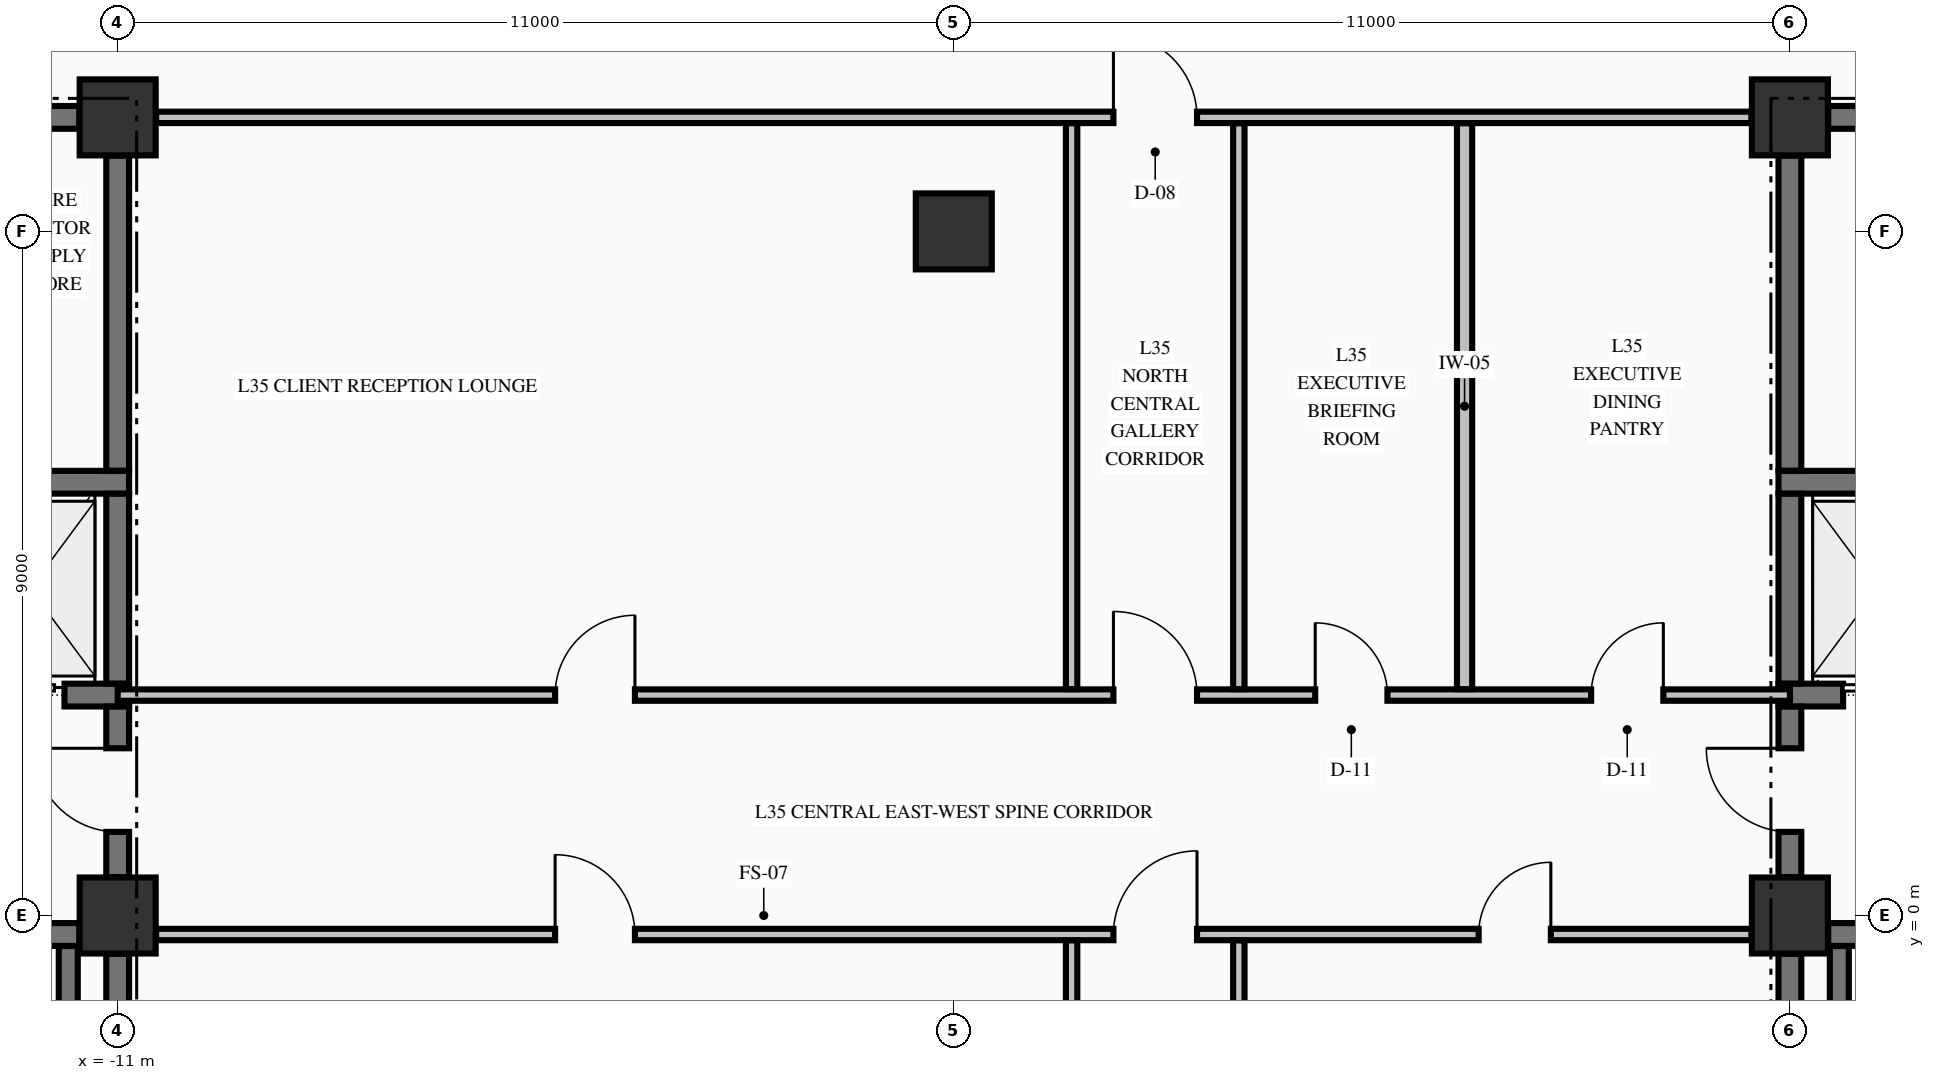
"""IFC4 building model, lengths in metres.
Left out: names, types, materials, properties, quantities, classifications, styles, units other than length and angle.
Written with IfcOpenShell. Run it as: python <this file> out.ifc"""

import sys

from ifc_helpers import new_model, si_unit, direction, frame, frame_2d, origin, origin_2d, place, context, subcontext, project, spatial, rectangle, extrude, element, fill, save


model = new_model("IFC4")
c1 = context("Model", 3, precision=1e-05, world=origin(), true_north=direction((0.0, 1.0)))
c2 = subcontext(c1, "Body", "Model", "MODEL_VIEW")
j1 = project(units=[si_unit("LENGTHUNIT", "METRE"), si_unit("PLANEANGLEUNIT", "RADIAN")], contexts=[c1])
p1 = place(None, origin())
s1 = spatial("IfcSite", under=j1, at=p1, CompositionType="ELEMENT")
p2 = place(p1, origin())
s2 = spatial("IfcBuilding", under=s1, at=p2, CompositionType="ELEMENT")
p3 = place(p2, frame((0.0, 0.0, 139.2)))
s3 = spatial("IfcBuildingStorey", under=s2, at=p3, CompositionType="ELEMENT", Elevation=139.2)
for number, where, z_axis, x_axis in (
    (1, (-11.0, 0.0, -0.25), (0.0, 0.0, 1.0), (1.0, 0.0, 0.0)),
    (2, (-11.0, 10.5, -0.25), (0.0, 0.0, 1.0), (1.0, 0.0, 0.0)),
    (3, (11.0, 0.0, -0.25), (0.0, 0.0, 1.0), (1.0, 0.0, 0.0)),
    (4, (11.0, 10.5, -0.25), (0.0, 0.0, 1.0), (1.0, 0.0, 0.0)),
    (5, (0.0, 9.0, -0.25), (0.0, 0.0, 1.0), (1.0, 0.0, 0.0)),
):
    element("IfcColumn", number, at=place(p3, frame(where, z_axis=z_axis, x_axis=x_axis)), inside=s3, PredefinedType="COLUMN", context=c2, shape_type="SweptSolid", body=[
        extrude(rectangle(XDim=1.0, YDim=1.0, at=origin_2d()), origin(), (0.0, 0.0, 1.0), 3.495),
    ])
p4 = place(p3, frame((-19.496, -0.25, 0.0), z_axis=(0.0, 0.0, 1.0), x_axis=(1.0, 0.0, 0.0)))
e6 = element("IfcWall", 6, at=p4, inside=s3, PredefinedType="SHEAR", context=c2, shape_type="SweptSolid", body=[
    extrude(rectangle(XDim=7.992, YDim=0.3, at=frame_2d((3.996, 0.0))), origin(), (0.0, 0.0, 1.0), 3.245),
])
p5 = place(p4, frame((5.796, 0.0, 0.0)))
e7 = element("IfcOpeningElement", 7, at=p5, cuts=e6, PredefinedType="OPENING", context=c2, shape_type="SweptSolid", body=[
    extrude(rectangle(XDim=1.1, YDim=2.15, at=frame_2d((0.55, 1.075))), frame((0.0, 0.16, 0.0), z_axis=(0.0, -1.0, 0.0), x_axis=(1.0, 0.0, 0.0)), (0.0, 0.0, 1.0), 0.32),
])
p6 = place(p3, frame((11.504, -0.25, 0.0), z_axis=(0.0, 0.0, 1.0), x_axis=(1.0, 0.0, 0.0)))
e8 = element("IfcWall", 8, at=p6, inside=s3, PredefinedType="SHEAR", context=c2, shape_type="SweptSolid", body=[
    extrude(rectangle(XDim=3.371, YDim=0.3, at=frame_2d((1.686, 0.0))), origin(), (0.0, 0.0, 1.0), 3.245),
])
p7 = place(p6, frame((1.096, 0.0, 0.0)))
e9 = element("IfcOpeningElement", 9, at=p7, cuts=e8, PredefinedType="OPENING", context=c2, shape_type="SweptSolid", body=[
    extrude(rectangle(XDim=1.1, YDim=2.15, at=frame_2d((0.55, 1.075))), frame((0.0, 0.16, 0.0), z_axis=(0.0, -1.0, 0.0), x_axis=(1.0, 0.0, 0.0)), (0.0, 0.0, 1.0), 0.32),
])
p8 = place(p3, frame((-14.875, 2.9, 0.0), z_axis=(0.0, 0.0, 1.0), x_axis=(1.0, 0.0, 0.0)))
e10 = element("IfcWall", 10, at=p8, inside=s3, PredefinedType="SHEAR", context=c2, shape_type="SweptSolid", body=[
    extrude(rectangle(XDim=4.025, YDim=0.3, at=frame_2d((2.012, 0.0))), origin(), (0.0, 0.0, 1.0), 3.245),
])
p9 = place(p8, frame((2.075, 0.0, 0.0)))
e11 = element("IfcOpeningElement", 11, at=p9, cuts=e10, PredefinedType="OPENING", context=c2, shape_type="SweptSolid", body=[
    extrude(rectangle(XDim=1.1, YDim=2.2, at=frame_2d((0.55, 1.1))), frame((0.0, 0.16, 0.0), z_axis=(0.0, -1.0, 0.0), x_axis=(1.0, 0.0, 0.0)), (0.0, 0.0, 1.0), 0.32),
])
p10 = place(p3, frame((10.85, 2.9, 0.0), z_axis=(0.0, 0.0, 1.0), x_axis=(1.0, 0.0, 0.0)))
e12 = element("IfcWall", 12, at=p10, inside=s3, PredefinedType="SHEAR", context=c2, shape_type="SweptSolid", body=[
    extrude(rectangle(XDim=4.025, YDim=0.3, at=frame_2d((2.012, 0.0))), origin(), (0.0, 0.0, 1.0), 3.245),
])
p11 = place(p10, frame((0.85, 0.0, 0.0)))
e13 = element("IfcOpeningElement", 13, at=p11, cuts=e12, PredefinedType="OPENING", context=c2, shape_type="SweptSolid", body=[
    extrude(rectangle(XDim=1.1, YDim=2.2, at=frame_2d((0.55, 1.1))), frame((0.0, 0.16, 0.0), z_axis=(0.0, -1.0, 0.0), x_axis=(1.0, 0.0, 0.0)), (0.0, 0.0, 1.0), 0.32),
])
for number, where, z_axis, x_axis in (
    (14, (-14.875, 5.7, 0.0), (0.0, 0.0, 1.0), (1.0, 0.0, 0.0)),
    (15, (10.85, 5.7, 0.0), (0.0, 0.0, 1.0), (1.0, 0.0, 0.0)),
):
    element("IfcWall", number, at=place(p3, frame(where, z_axis=z_axis, x_axis=x_axis)), inside=s3, PredefinedType="SHEAR", context=c2, shape_type="SweptSolid", body=[
        extrude(rectangle(XDim=4.025, YDim=0.3, at=frame_2d((2.012, 0.0))), origin(), (0.0, 0.0, 1.0), 3.245),
    ])
p12 = place(p3, frame((-14.7, 10.5, 0.0), z_axis=(0.0, 0.0, 1.0), x_axis=(1.0, 0.0, 0.0)))
e16 = element("IfcWall", 16, at=p12, inside=s3, PredefinedType="SHEAR", context=c2, shape_type="SweptSolid", body=[
    extrude(rectangle(XDim=3.196, YDim=0.3, at=frame_2d((1.598, 0.0))), origin(), (0.0, 0.0, 1.0), 3.245),
])
p13 = place(p12, frame((0.245, 0.0, 0.0)))
e17 = element("IfcOpeningElement", 17, at=p13, cuts=e16, PredefinedType="OPENING", context=c2, shape_type="SweptSolid", body=[
    extrude(rectangle(XDim=0.95, YDim=2.15, at=frame_2d((0.475, 1.075))), frame((0.0, 0.16, 0.0), z_axis=(0.0, -1.0, 0.0), x_axis=(1.0, 0.0, 0.0)), (0.0, 0.0, 1.0), 0.32),
])
p14 = place(p3, frame((11.504, 10.5, 0.0), z_axis=(0.0, 0.0, 1.0), x_axis=(1.0, 0.0, 0.0)))
e18 = element("IfcWall", 18, at=p14, inside=s3, PredefinedType="SHEAR", context=c2, shape_type="SweptSolid", body=[
    extrude(rectangle(XDim=3.196, YDim=0.3, at=frame_2d((1.598, 0.0))), origin(), (0.0, 0.0, 1.0), 3.245),
])
p15 = place(p14, frame((1.471, 0.0, 0.0)))
e19 = element("IfcOpeningElement", 19, at=p15, cuts=e18, PredefinedType="OPENING", context=c2, shape_type="SweptSolid", body=[
    extrude(rectangle(XDim=0.95, YDim=2.15, at=frame_2d((0.475, 1.075))), frame((0.0, 0.16, 0.0), z_axis=(0.0, -1.0, 0.0), x_axis=(1.0, 0.0, 0.0)), (0.0, 0.0, 1.0), 0.32),
])
p16 = place(p3, frame((-10.494, -0.25, 0.0), z_axis=(0.0, 0.0, 1.0), x_axis=(1.0, 0.0, 0.0)))
e20 = element("IfcWall", 20, at=p16, inside=s3, PredefinedType="PARTITIONING", context=c2, shape_type="SweptSolid", body=[
    extrude(rectangle(XDim=20.988, YDim=0.15, at=frame_2d((10.494, 0.0))), origin(), (0.0, 0.0, 1.0), 3.245),
])
p17 = place(p16, frame((12.594, 0.0, 0.0)))
e21 = element("IfcOpeningElement", 21, at=p17, cuts=e20, PredefinedType="OPENING", context=c2, shape_type="SweptSolid", body=[
    extrude(rectangle(XDim=1.1, YDim=2.15, at=frame_2d((0.55, 1.075))), frame((0.0, 0.085, 0.0), z_axis=(0.0, -1.0, 0.0), x_axis=(1.0, 0.0, 0.0)), (0.0, 0.0, 1.0), 0.17),
])
p18 = place(p16, frame((5.249, 0.0, 0.0)))
e22 = element("IfcOpeningElement", 22, at=p18, cuts=e20, PredefinedType="OPENING", context=c2, shape_type="SweptSolid", body=[
    extrude(rectangle(XDim=1.05, YDim=2.15, at=frame_2d((0.525, 1.075))), frame((0.0, 0.085, 0.0), z_axis=(0.0, -1.0, 0.0), x_axis=(1.0, 0.0, 0.0)), (0.0, 0.0, 1.0), 0.17),
])
p19 = place(p16, frame((17.399, 0.0, 0.0)))
e23 = element("IfcOpeningElement", 23, at=p19, cuts=e20, PredefinedType="OPENING", context=c2, shape_type="SweptSolid", body=[
    extrude(rectangle(XDim=0.95, YDim=2.15, at=frame_2d((0.475, 1.075))), frame((0.0, 0.085, 0.0), z_axis=(0.0, -1.0, 0.0), x_axis=(1.0, 0.0, 0.0)), (0.0, 0.0, 1.0), 0.17),
])
p20 = place(p3, frame((-11.0, 2.9, 0.0), z_axis=(0.0, 0.0, 1.0), x_axis=(1.0, 0.0, 0.0)))
e24 = element("IfcWall", 24, at=p20, inside=s3, PredefinedType="PARTITIONING", context=c2, shape_type="SweptSolid", body=[
    extrude(rectangle(XDim=22.0, YDim=0.15, at=frame_2d((11.0, 0.0))), origin(), (0.0, 0.0, 1.0), 3.245),
])
p21 = place(p20, frame((13.1, 0.0, 0.0)))
e25 = element("IfcOpeningElement", 25, at=p21, cuts=e24, PredefinedType="OPENING", context=c2, shape_type="SweptSolid", body=[
    extrude(rectangle(XDim=1.1, YDim=2.15, at=frame_2d((0.55, 1.075))), frame((0.0, 0.085, 0.0), z_axis=(0.0, -1.0, 0.0), x_axis=(1.0, 0.0, 0.0)), (0.0, 0.0, 1.0), 0.17),
])
p22 = place(p20, frame((5.755, 0.0, 0.0)))
e26 = element("IfcOpeningElement", 26, at=p22, cuts=e24, PredefinedType="OPENING", context=c2, shape_type="SweptSolid", body=[
    extrude(rectangle(XDim=1.05, YDim=2.15, at=frame_2d((0.525, 1.075))), frame((0.0, 0.085, 0.0), z_axis=(0.0, -1.0, 0.0), x_axis=(1.0, 0.0, 0.0)), (0.0, 0.0, 1.0), 0.17),
])
p23 = place(p20, frame((15.755, 0.0, 0.0)))
e27 = element("IfcOpeningElement", 27, at=p23, cuts=e24, PredefinedType="OPENING", context=c2, shape_type="SweptSolid", body=[
    extrude(rectangle(XDim=0.95, YDim=2.15, at=frame_2d((0.475, 1.075))), frame((0.0, 0.085, 0.0), z_axis=(0.0, -1.0, 0.0), x_axis=(1.0, 0.0, 0.0)), (0.0, 0.0, 1.0), 0.17),
])
p24 = place(p20, frame((19.385, 0.0, 0.0)))
e28 = element("IfcOpeningElement", 28, at=p24, cuts=e24, PredefinedType="OPENING", context=c2, shape_type="SweptSolid", body=[
    extrude(rectangle(XDim=0.95, YDim=2.15, at=frame_2d((0.475, 1.075))), frame((0.0, 0.085, 0.0), z_axis=(0.0, -1.0, 0.0), x_axis=(1.0, 0.0, 0.0)), (0.0, 0.0, 1.0), 0.17),
])
p25 = place(p3, frame((-10.494, 10.5, 0.0), z_axis=(0.0, 0.0, 1.0), x_axis=(1.0, 0.0, 0.0)))
e29 = element("IfcWall", 29, at=p25, inside=s3, PredefinedType="PARTITIONING", context=c2, shape_type="SweptSolid", body=[
    extrude(rectangle(XDim=20.988, YDim=0.15, at=frame_2d((10.494, 0.0))), origin(), (0.0, 0.0, 1.0), 3.245),
])
p26 = place(p25, frame((12.594, 0.0, 0.0)))
e30 = element("IfcOpeningElement", 30, at=p26, cuts=e29, PredefinedType="OPENING", context=c2, shape_type="SweptSolid", body=[
    extrude(rectangle(XDim=1.1, YDim=2.15, at=frame_2d((0.55, 1.075))), frame((0.0, 0.085, 0.0), z_axis=(0.0, -1.0, 0.0), x_axis=(1.0, 0.0, 0.0)), (0.0, 0.0, 1.0), 0.17),
])
p27 = place(p3, frame((-11.65, -9.798, 0.0), z_axis=(0.0, 0.0, 1.0), x_axis=(0.0, 1.0, 0.0)))
e31 = element("IfcWall", 31, at=p27, inside=s3, PredefinedType="SOLIDWALL", context=c2, shape_type="SweptSolid", body=[
    extrude(rectangle(XDim=9.396, YDim=0.25, at=frame_2d((4.698, 0.0))), origin(), (0.0, 0.0, 1.0), 3.245),
])
p28 = place(p3, frame((-11.0, -9.446, 0.0), z_axis=(0.0, 0.0, 1.0), x_axis=(0.0, 1.0, 0.0)))
e32 = element("IfcWall", 32, at=p28, inside=s3, PredefinedType="SHEAR", context=c2, shape_type="SweptSolid", body=[
    extrude(rectangle(XDim=8.942, YDim=0.3, at=frame_2d((4.471, 0.0))), origin(), (0.0, 0.0, 1.0), 3.245),
])
p29 = place(p3, frame((-11.0, 0.504, 0.0), z_axis=(0.0, 0.0, 1.0), x_axis=(0.0, 1.0, 0.0)))
e33 = element("IfcWall", 33, at=p29, inside=s3, PredefinedType="SHEAR", context=c2, shape_type="SweptSolid", body=[
    extrude(rectangle(XDim=2.244, YDim=0.3, at=frame_2d((1.122, 0.0))), origin(), (0.0, 0.0, 1.0), 3.245),
])
p30 = place(p29, frame((0.596, 0.0, 0.0)))
e34 = element("IfcOpeningElement", 34, at=p30, cuts=e33, PredefinedType="OPENING", context=c2, shape_type="SweptSolid", body=[
    extrude(rectangle(XDim=1.1, YDim=2.15, at=frame_2d((0.55, 1.075))), frame((0.0, 0.16, 0.0), z_axis=(0.0, -1.0, 0.0), x_axis=(1.0, 0.0, 0.0)), (0.0, 0.0, 1.0), 0.32),
])
p31 = place(p3, frame((-11.0, 3.052, 0.0), z_axis=(0.0, 0.0, 1.0), x_axis=(0.0, 1.0, 0.0)))
e35 = element("IfcWall", 35, at=p31, inside=s3, PredefinedType="SHEAR", context=c2, shape_type="SweptSolid", body=[
    extrude(rectangle(XDim=2.496, YDim=0.3, at=frame_2d((1.248, 0.0))), origin(), (0.0, 0.0, 1.0), 3.245),
])
p32 = place(p3, frame((-11.0, 5.852, 0.0), z_axis=(0.0, 0.0, 1.0), x_axis=(0.0, 1.0, 0.0)))
e36 = element("IfcWall", 36, at=p32, inside=s3, PredefinedType="SHEAR", context=c2, shape_type="SweptSolid", body=[
    extrude(rectangle(XDim=4.144, YDim=0.3, at=frame_2d((2.072, 0.0))), origin(), (0.0, 0.0, 1.0), 3.245),
])
p33 = place(p3, frame((11.0, -9.446, 0.0), z_axis=(0.0, 0.0, 1.0), x_axis=(0.0, 1.0, 0.0)))
e37 = element("IfcWall", 37, at=p33, inside=s3, PredefinedType="SHEAR", context=c2, shape_type="SweptSolid", body=[
    extrude(rectangle(XDim=8.942, YDim=0.3, at=frame_2d((4.471, 0.0))), origin(), (0.0, 0.0, 1.0), 3.245),
])
p34 = place(p3, frame((11.0, 0.504, 0.0), z_axis=(0.0, 0.0, 1.0), x_axis=(0.0, 1.0, 0.0)))
e38 = element("IfcWall", 38, at=p34, inside=s3, PredefinedType="SHEAR", context=c2, shape_type="SweptSolid", body=[
    extrude(rectangle(XDim=2.244, YDim=0.3, at=frame_2d((1.122, 0.0))), origin(), (0.0, 0.0, 1.0), 3.245),
])
p35 = place(p34, frame((0.596, 0.0, 0.0)))
e39 = element("IfcOpeningElement", 39, at=p35, cuts=e38, PredefinedType="OPENING", context=c2, shape_type="SweptSolid", body=[
    extrude(rectangle(XDim=1.1, YDim=2.15, at=frame_2d((0.55, 1.075))), frame((0.0, 0.16, 0.0), z_axis=(0.0, -1.0, 0.0), x_axis=(1.0, 0.0, 0.0)), (0.0, 0.0, 1.0), 0.32),
])
p36 = place(p3, frame((11.0, 3.052, 0.0), z_axis=(0.0, 0.0, 1.0), x_axis=(0.0, 1.0, 0.0)))
e40 = element("IfcWall", 40, at=p36, inside=s3, PredefinedType="SHEAR", context=c2, shape_type="SweptSolid", body=[
    extrude(rectangle(XDim=2.496, YDim=0.3, at=frame_2d((1.248, 0.0))), origin(), (0.0, 0.0, 1.0), 3.245),
])
p37 = place(p3, frame((11.0, 5.852, 0.0), z_axis=(0.0, 0.0, 1.0), x_axis=(0.0, 1.0, 0.0)))
e41 = element("IfcWall", 41, at=p37, inside=s3, PredefinedType="SHEAR", context=c2, shape_type="SweptSolid", body=[
    extrude(rectangle(XDim=4.144, YDim=0.3, at=frame_2d((2.072, 0.0))), origin(), (0.0, 0.0, 1.0), 3.245),
])
p38 = place(p3, frame((11.65, -9.798, 0.0), z_axis=(0.0, 0.0, 1.0), x_axis=(0.0, 1.0, 0.0)))
e42 = element("IfcWall", 42, at=p38, inside=s3, PredefinedType="SOLIDWALL", context=c2, shape_type="SweptSolid", body=[
    extrude(rectangle(XDim=9.396, YDim=0.25, at=frame_2d((4.698, 0.0))), origin(), (0.0, 0.0, 1.0), 3.245),
])
p39 = place(p3, frame((1.55, -9.872, 0.0), z_axis=(0.0, 0.0, 1.0), x_axis=(0.0, 1.0, 0.0)))
e43 = element("IfcWall", 43, at=p39, inside=s3, PredefinedType="PARTITIONING", context=c2, shape_type="SweptSolid", body=[
    extrude(rectangle(XDim=9.544, YDim=0.15, at=frame_2d((4.772, 0.0))), origin(), (0.0, 0.0, 1.0), 3.245),
])
p40 = place(p3, frame((1.55, 2.978, 0.0), z_axis=(0.0, 0.0, 1.0), x_axis=(0.0, 1.0, 0.0)))
e44 = element("IfcWall", 44, at=p40, inside=s3, PredefinedType="PARTITIONING", context=c2, shape_type="SweptSolid", body=[
    extrude(rectangle(XDim=7.444, YDim=0.15, at=frame_2d((3.722, 0.0))), origin(), (0.0, 0.0, 1.0), 3.245),
])
p41 = place(p3, frame((3.75, -4.147, 0.0), z_axis=(0.0, 0.0, 1.0), x_axis=(0.0, 1.0, 0.0)))
e45 = element("IfcWall", 45, at=p41, inside=s3, PredefinedType="PARTITIONING", context=c2, shape_type="SweptSolid", body=[
    extrude(rectangle(XDim=3.819, YDim=0.15, at=frame_2d((1.91, 0.0))), origin(), (0.0, 0.0, 1.0), 3.245),
])
p42 = place(p3, frame((3.75, 2.978, 0.0), z_axis=(0.0, 0.0, 1.0), x_axis=(0.0, 1.0, 0.0)))
e46 = element("IfcWall", 46, at=p42, inside=s3, PredefinedType="PARTITIONING", context=c2, shape_type="SweptSolid", body=[
    extrude(rectangle(XDim=7.444, YDim=0.15, at=frame_2d((3.722, 0.0))), origin(), (0.0, 0.0, 1.0), 3.245),
])
p43 = place(p3, frame((6.72, 2.978, 0.0), z_axis=(0.0, 0.0, 1.0), x_axis=(0.0, 1.0, 0.0)))
e47 = element("IfcWall", 47, at=p43, inside=s3, PredefinedType="PARTITIONING", context=c2, shape_type="SweptSolid", body=[
    extrude(rectangle(XDim=7.444, YDim=0.2, at=frame_2d((3.722, 0.0))), origin(), (0.0, 0.0, 1.0), 3.245),
])
p44 = place(p30, origin())
e48 = element("IfcDoor", 48, at=p44, inside=s3, OperationType="SINGLE_SWING_RIGHT", PredefinedType="DOOR", context=c2, shape_type="SweptSolid", body=[
    extrude(rectangle(XDim=1.1, YDim=2.15, at=frame_2d((0.55, 1.075))), frame((0.0, 0.025, 0.0), z_axis=(0.0, -1.0, 0.0), x_axis=(1.0, 0.0, 0.0)), (0.0, 0.0, 1.0), 0.05),
])
fill(e34, e48)
p45 = place(p9, origin())
e49 = element("IfcDoor", 49, at=p45, inside=s3, OperationType="SLIDING_TO_LEFT", PredefinedType="DOOR", context=c2, shape_type="SweptSolid", body=[
    extrude(rectangle(XDim=1.1, YDim=2.2, at=frame_2d((0.55, 1.1))), frame((0.0, 0.025, 0.0), z_axis=(0.0, -1.0, 0.0), x_axis=(1.0, 0.0, 0.0)), (0.0, 0.0, 1.0), 0.05),
])
fill(e11, e49)
p46 = place(p35, origin())
e50 = element("IfcDoor", 50, at=p46, inside=s3, OperationType="SINGLE_SWING_RIGHT", PredefinedType="DOOR", context=c2, shape_type="SweptSolid", body=[
    extrude(rectangle(XDim=1.1, YDim=2.15, at=frame_2d((0.55, 1.075))), frame((0.0, 0.025, 0.0), z_axis=(0.0, -1.0, 0.0), x_axis=(1.0, 0.0, 0.0)), (0.0, 0.0, 1.0), 0.05),
])
fill(e39, e50)
p47 = place(p11, origin())
e51 = element("IfcDoor", 51, at=p47, inside=s3, OperationType="SLIDING_TO_RIGHT", PredefinedType="DOOR", context=c2, shape_type="SweptSolid", body=[
    extrude(rectangle(XDim=1.1, YDim=2.2, at=frame_2d((0.55, 1.1))), frame((0.0, 0.025, 0.0), z_axis=(0.0, -1.0, 0.0), x_axis=(1.0, 0.0, 0.0)), (0.0, 0.0, 1.0), 0.05),
])
fill(e13, e51)
p48 = place(p26, origin())
e52 = element("IfcDoor", 52, at=p48, inside=s3, OperationType="SINGLE_SWING_LEFT", PredefinedType="DOOR", context=c2, shape_type="SweptSolid", body=[
    extrude(rectangle(XDim=1.1, YDim=2.15, at=frame_2d((0.55, 1.075))), frame((0.0, 0.025, 0.0), z_axis=(0.0, -1.0, 0.0), x_axis=(1.0, 0.0, 0.0)), (0.0, 0.0, 1.0), 0.05),
])
fill(e30, e52)
p49 = place(p21, origin())
e53 = element("IfcDoor", 53, at=p49, inside=s3, OperationType="SINGLE_SWING_LEFT", PredefinedType="DOOR", context=c2, shape_type="SweptSolid", body=[
    extrude(rectangle(XDim=1.1, YDim=2.15, at=frame_2d((0.55, 1.075))), frame((0.0, 0.025, 0.0), z_axis=(0.0, -1.0, 0.0), x_axis=(1.0, 0.0, 0.0)), (0.0, 0.0, 1.0), 0.05),
])
fill(e25, e53)
p50 = place(p17, origin())
e54 = element("IfcDoor", 54, at=p50, inside=s3, OperationType="SINGLE_SWING_RIGHT", PredefinedType="DOOR", context=c2, shape_type="SweptSolid", body=[
    extrude(rectangle(XDim=1.1, YDim=2.15, at=frame_2d((0.55, 1.075))), frame((0.0, 0.025, 0.0), z_axis=(0.0, -1.0, 0.0), x_axis=(1.0, 0.0, 0.0)), (0.0, 0.0, 1.0), 0.05),
])
fill(e21, e54)
p51 = place(p22, origin())
e55 = element("IfcDoor", 55, at=p51, inside=s3, OperationType="SINGLE_SWING_RIGHT", PredefinedType="DOOR", context=c2, shape_type="SweptSolid", body=[
    extrude(rectangle(XDim=1.05, YDim=2.15, at=frame_2d((0.525, 1.075))), frame((0.0, 0.025, 0.0), z_axis=(0.0, -1.0, 0.0), x_axis=(1.0, 0.0, 0.0)), (0.0, 0.0, 1.0), 0.05),
])
fill(e26, e55)
p52 = place(p23, origin())
e56 = element("IfcDoor", 56, at=p52, inside=s3, OperationType="SINGLE_SWING_LEFT", PredefinedType="DOOR", context=c2, shape_type="SweptSolid", body=[
    extrude(rectangle(XDim=0.95, YDim=2.15, at=frame_2d((0.475, 1.075))), frame((0.0, 0.025, 0.0), z_axis=(0.0, -1.0, 0.0), x_axis=(1.0, 0.0, 0.0)), (0.0, 0.0, 1.0), 0.05),
])
fill(e27, e56)
p53 = place(p24, origin())
e57 = element("IfcDoor", 57, at=p53, inside=s3, OperationType="SINGLE_SWING_RIGHT", PredefinedType="DOOR", context=c2, shape_type="SweptSolid", body=[
    extrude(rectangle(XDim=0.95, YDim=2.15, at=frame_2d((0.475, 1.075))), frame((0.0, 0.025, 0.0), z_axis=(0.0, -1.0, 0.0), x_axis=(1.0, 0.0, 0.0)), (0.0, 0.0, 1.0), 0.05),
])
fill(e28, e57)
p54 = place(p18, origin())
e58 = element("IfcDoor", 58, at=p54, inside=s3, OperationType="SINGLE_SWING_LEFT", PredefinedType="DOOR", context=c2, shape_type="SweptSolid", body=[
    extrude(rectangle(XDim=1.05, YDim=2.15, at=frame_2d((0.525, 1.075))), frame((0.0, 0.025, 0.0), z_axis=(0.0, -1.0, 0.0), x_axis=(1.0, 0.0, 0.0)), (0.0, 0.0, 1.0), 0.05),
])
fill(e22, e58)
p55 = place(p19, origin())
e59 = element("IfcDoor", 59, at=p55, inside=s3, OperationType="SINGLE_SWING_RIGHT", PredefinedType="DOOR", context=c2, shape_type="SweptSolid", body=[
    extrude(rectangle(XDim=0.95, YDim=2.15, at=frame_2d((0.475, 1.075))), frame((0.0, 0.025, 0.0), z_axis=(0.0, -1.0, 0.0), x_axis=(1.0, 0.0, 0.0)), (0.0, 0.0, 1.0), 0.05),
])
fill(e23, e59)
save(model, sys.argv[1])
